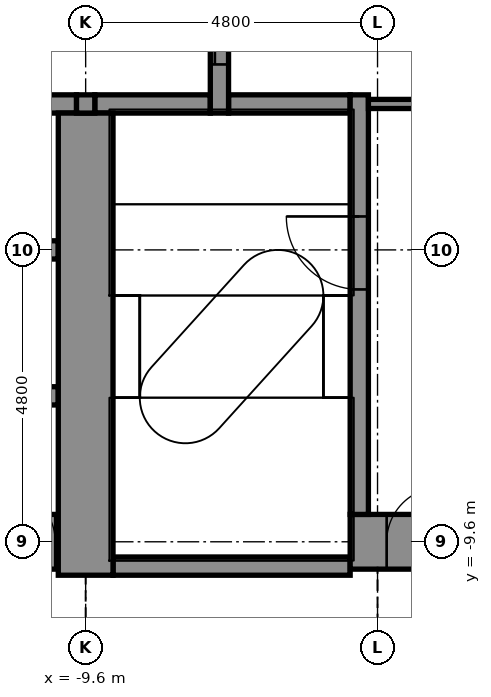
"""IFC4 building model, lengths in metres.
Left out: names, types, materials, properties, quantities, classifications, styles, units other than length and angle.
Written with IfcOpenShell. Run it as: python <this file> out.ifc"""

import sys

from ifc_helpers import new_model, si_unit, direction, frame, frame_2d, origin, place, context, subcontext, project, spatial, rectangle, extrude, element, fill, save


model = new_model("IFC4")
c1 = context("Model", 3, precision=1e-05, world=origin(), true_north=direction((0.0, 1.0)))
c2 = subcontext(c1, "Body", "Model", "MODEL_VIEW")
j1 = project(units=[si_unit("LENGTHUNIT", "METRE"), si_unit("PLANEANGLEUNIT", "RADIAN")], contexts=[c1])
p1 = place(None, origin())
s1 = spatial("IfcSite", under=j1, at=p1, CompositionType="ELEMENT")
p2 = place(p1, origin())
s2 = spatial("IfcBuilding", under=s1, at=p2, CompositionType="ELEMENT")
p3 = place(p2, frame((0.0, 0.0, 109.4)))
s3 = spatial("IfcBuildingStorey", under=s2, at=p3, CompositionType="ELEMENT", Elevation=109.4)
p4 = place(p3, frame((-9.15, -10.0, -0.2), z_axis=(0.0, 0.0, 1.0), x_axis=(1.0, 0.0, 0.0)))
e1 = element("IfcWall", 1, at=p4, inside=s3, PredefinedType="STANDARD", context=c2, shape_type="SweptSolid", body=[
    extrude(rectangle(XDim=3.9, YDim=0.3, at=frame_2d((1.95, 0.0))), origin(), (0.0, 0.0, 1.0), 4.5),
])
p5 = place(p3, frame((-13.95, -9.6, -0.2), z_axis=(0.0, 0.0, 1.0), x_axis=(1.0, 0.0, 0.0)))
e2 = element("IfcWall", 2, at=p5, inside=s3, PredefinedType="SHEAR", context=c2, shape_type="SweptSolid", body=[
    extrude(rectangle(XDim=3.9, YDim=0.9, at=frame_2d((1.95, 0.0))), origin(), (0.0, 0.0, 1.0), 4.5),
])
p6 = place(p5, frame((0.7, 0.0, 0.2)))
e3 = element("IfcOpeningElement", 3, at=p6, cuts=e2, PredefinedType="OPENING", context=c2, shape_type="SweptSolid", body=[
    extrude(rectangle(XDim=0.9, YDim=2.1, at=frame_2d((0.45, 1.05))), frame((0.0, 0.46, 0.0), z_axis=(0.0, -1.0, 0.0), x_axis=(1.0, 0.0, 0.0)), (0.0, 0.0, 1.0), 0.92),
])
p7 = place(p5, frame((2.95, 0.0, 0.2)))
e4 = element("IfcOpeningElement", 4, at=p7, cuts=e2, PredefinedType="OPENING", context=c2, shape_type="SweptSolid", body=[
    extrude(rectangle(XDim=0.9, YDim=2.1, at=frame_2d((0.45, 1.05))), frame((0.0, 0.46, 0.0), z_axis=(0.0, -1.0, 0.0), x_axis=(1.0, 0.0, 0.0)), (0.0, 0.0, 1.0), 0.92),
])
p8 = place(p3, frame((-5.25, -9.6, -0.2), z_axis=(0.0, 0.0, 1.0), x_axis=(1.0, 0.0, 0.0)))
e5 = element("IfcWall", 5, at=p8, inside=s3, PredefinedType="SHEAR", context=c2, shape_type="SweptSolid", body=[
    extrude(rectangle(XDim=10.2, YDim=0.9, at=frame_2d((5.1, 0.0))), origin(), (0.0, 0.0, 1.0), 4.5),
])
p9 = place(p8, frame((0.6, 0.0, 0.2)))
e6 = element("IfcOpeningElement", 6, at=p9, cuts=e5, PredefinedType="OPENING", context=c2, shape_type="SweptSolid", body=[
    extrude(rectangle(XDim=0.9, YDim=2.1, at=frame_2d((0.45, 1.05))), frame((0.0, 0.46, 0.0), z_axis=(0.0, -1.0, 0.0), x_axis=(1.0, 0.0, 0.0)), (0.0, 0.0, 1.0), 0.92),
])
for number, where, z_axis, x_axis in (
    (7, (-13.95, -7.2, -0.2), (0.0, 0.0, 1.0), (1.0, 0.0, 0.0)),
    (8, (-13.95, -4.8, -0.2), (0.0, 0.0, 1.0), (1.0, 0.0, 0.0)),
):
    element("IfcWall", number, at=place(p3, frame(where, z_axis=z_axis, x_axis=x_axis)), inside=s3, PredefinedType="STANDARD", context=c2, shape_type="SweptSolid", body=[
        extrude(rectangle(XDim=3.9, YDim=0.3, at=frame_2d((1.95, 0.0))), origin(), (0.0, 0.0, 1.0), 4.5),
    ])
p10 = place(p3, frame((-10.85, -2.4, -0.2), z_axis=(0.0, 0.0, 1.0), x_axis=(1.0, 0.0, 0.0)))
e9 = element("IfcWall", 9, at=p10, inside=s3, PredefinedType="STANDARD", context=c2, shape_type="SweptSolid", body=[
    extrude(rectangle(XDim=1.1, YDim=0.3, at=frame_2d((0.55, 0.0))), origin(), (0.0, 0.0, 1.0), 4.5),
])
p11 = place(p3, frame((-9.45, -2.4, -0.2), z_axis=(0.0, 0.0, 1.0), x_axis=(1.0, 0.0, 0.0)))
e10 = element("IfcWall", 10, at=p11, inside=s3, PredefinedType="STANDARD", context=c2, shape_type="SweptSolid", body=[
    extrude(rectangle(XDim=1.9, YDim=0.3, at=frame_2d((0.95, 0.0))), origin(), (0.0, 0.0, 1.0), 4.5),
])
p12 = place(p3, frame((-7.25, -2.4, -0.2), z_axis=(0.0, 0.0, 1.0), x_axis=(1.0, 0.0, 0.0)))
e11 = element("IfcWall", 11, at=p12, inside=s3, PredefinedType="STANDARD", context=c2, shape_type="SweptSolid", body=[
    extrude(rectangle(XDim=2.0, YDim=0.3, at=frame_2d((1.0, 0.0))), origin(), (0.0, 0.0, 1.0), 4.5),
])
p13 = place(p3, frame((-9.6, -10.15, -0.2), z_axis=(0.0, 0.0, 1.0), x_axis=(0.0, 1.0, 0.0)))
e12 = element("IfcWall", 12, at=p13, inside=s3, PredefinedType="SHEAR", context=c2, shape_type="SweptSolid", body=[
    extrude(rectangle(XDim=7.6, YDim=0.9, at=frame_2d((3.8, 0.0))), origin(), (0.0, 0.0, 1.0), 4.5),
])
p14 = place(p3, frame((-9.6, -2.55, -0.2), z_axis=(0.0, 0.0, 1.0), x_axis=(0.0, 1.0, 0.0)))
e13 = element("IfcWall", 13, at=p14, inside=s3, PredefinedType="STANDARD", context=c2, shape_type="SweptSolid", body=[
    extrude(rectangle(XDim=0.3, YDim=0.3, at=frame_2d((0.15, 0.0))), origin(), (0.0, 0.0, 1.0), 4.5),
])
p15 = place(p3, frame((-7.4, -2.55, -0.2), z_axis=(0.0, 0.0, 1.0), x_axis=(0.0, 1.0, 0.0)))
e14 = element("IfcWall", 14, at=p15, inside=s3, PredefinedType="STANDARD", context=c2, shape_type="SweptSolid", body=[
    extrude(rectangle(XDim=5.1, YDim=0.3, at=frame_2d((2.55, 0.0))), origin(), (0.0, 0.0, 1.0), 4.5),
])
p16 = place(p15, frame((0.8, 0.0, 0.2)))
e15 = element("IfcOpeningElement", 15, at=p16, cuts=e14, PredefinedType="OPENING", context=c2, shape_type="SweptSolid", body=[
    extrude(rectangle(XDim=1.1, YDim=2.1, at=frame_2d((0.55, 1.05))), frame((0.0, 0.16, 0.0), z_axis=(0.0, -1.0, 0.0), x_axis=(1.0, 0.0, 0.0)), (0.0, 0.0, 1.0), 0.32),
])
p17 = place(p15, frame((3.2, 0.0, 0.2)))
e16 = element("IfcOpeningElement", 16, at=p17, cuts=e14, PredefinedType="OPENING", context=c2, shape_type="SweptSolid", body=[
    extrude(rectangle(XDim=1.1, YDim=2.1, at=frame_2d((0.55, 1.05))), frame((0.0, 0.16, 0.0), z_axis=(0.0, -1.0, 0.0), x_axis=(1.0, 0.0, 0.0)), (0.0, 0.0, 1.0), 0.32),
])
p18 = place(p3, frame((-5.1, -9.15, -0.2), z_axis=(0.0, 0.0, 1.0), x_axis=(0.0, 1.0, 0.0)))
e17 = element("IfcWall", 17, at=p18, inside=s3, PredefinedType="STANDARD", context=c2, shape_type="SweptSolid", body=[
    extrude(rectangle(XDim=6.9, YDim=0.3, at=frame_2d((3.45, 0.0))), origin(), (0.0, 0.0, 1.0), 4.5),
])
p19 = place(p18, frame((3.7, 0.0, 0.2)))
e18 = element("IfcOpeningElement", 18, at=p19, cuts=e17, PredefinedType="OPENING", context=c2, shape_type="SweptSolid", body=[
    extrude(rectangle(XDim=1.2, YDim=2.1, at=frame_2d((0.6, 1.05))), frame((0.0, 0.16, 0.0), z_axis=(0.0, -1.0, 0.0), x_axis=(1.0, 0.0, 0.0)), (0.0, 0.0, 1.0), 0.32),
])
p20 = place(p3, frame((-4.95, -2.4, 0.0), z_axis=(0.0, 0.0, 1.0), x_axis=(1.0, 0.0, 0.0)))
e19 = element("IfcWall", 19, at=p20, inside=s3, PredefinedType="PARTITIONING", context=c2, shape_type="SweptSolid", body=[
    extrude(rectangle(XDim=1.2, YDim=0.15, at=frame_2d((0.6, 0.0))), origin(), (0.0, 0.0, 1.0), 4.3),
])
p21 = place(p16, origin())
e20 = element("IfcDoor", 20, at=p21, inside=s3, OperationType="DOUBLE_DOOR_SLIDING", PredefinedType="DOOR", context=c2, shape_type="SweptSolid", body=[
    extrude(rectangle(XDim=1.1, YDim=2.1, at=frame_2d((0.55, 1.05))), frame((0.0, 0.025, 0.0), z_axis=(0.0, -1.0, 0.0), x_axis=(1.0, 0.0, 0.0)), (0.0, 0.0, 1.0), 0.05),
])
fill(e15, e20)
p22 = place(p19, origin())
e21 = element("IfcDoor", 21, at=p22, inside=s3, OperationType="SINGLE_SWING_RIGHT", PredefinedType="DOOR", context=c2, shape_type="SweptSolid", body=[
    extrude(rectangle(XDim=1.2, YDim=2.1, at=frame_2d((0.6, 1.05))), frame((0.0, 0.025, 0.0), z_axis=(0.0, -1.0, 0.0), x_axis=(1.0, 0.0, 0.0)), (0.0, 0.0, 1.0), 0.05),
])
fill(e18, e21)
p23 = place(p7, origin())
e22 = element("IfcDoor", 22, at=p23, inside=s3, OperationType="SINGLE_SWING_LEFT", PredefinedType="DOOR", context=c2, shape_type="SweptSolid", body=[
    extrude(rectangle(XDim=0.9, YDim=2.1, at=frame_2d((0.45, 1.05))), frame((0.0, 0.025, 0.0), z_axis=(0.0, -1.0, 0.0), x_axis=(1.0, 0.0, 0.0)), (0.0, 0.0, 1.0), 0.05),
])
fill(e4, e22)
p24 = place(p9, origin())
e23 = element("IfcDoor", 23, at=p24, inside=s3, OperationType="SINGLE_SWING_RIGHT", PredefinedType="DOOR", context=c2, shape_type="SweptSolid", body=[
    extrude(rectangle(XDim=0.9, YDim=2.1, at=frame_2d((0.45, 1.05))), frame((0.0, 0.025, 0.0), z_axis=(0.0, -1.0, 0.0), x_axis=(1.0, 0.0, 0.0)), (0.0, 0.0, 1.0), 0.05),
])
fill(e6, e23)
save(model, sys.argv[1])
